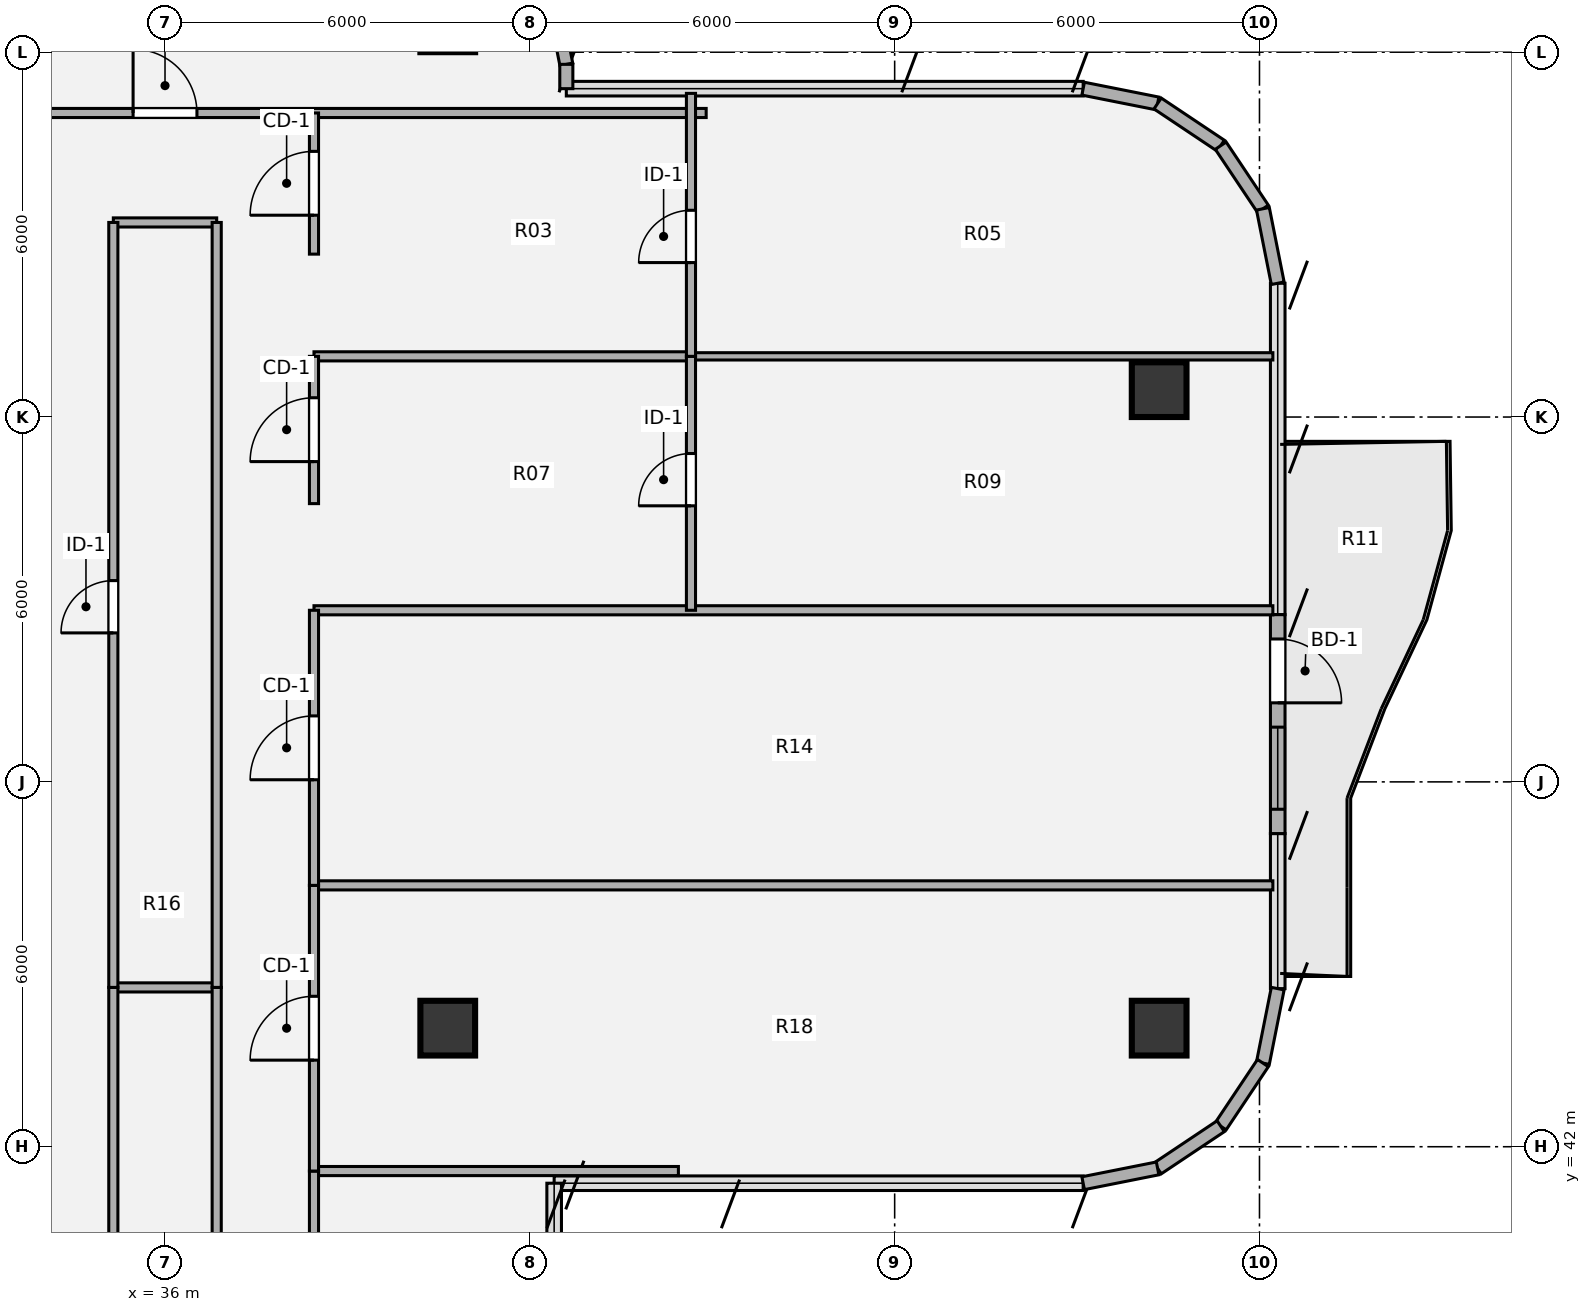
"""IFC4 building model, lengths in metres.
Left out: names, types, materials, properties, quantities, classifications, styles, units other than length and angle.
Written with IfcOpenShell. Run it as: python <this file> out.ifc"""

import sys

from ifc_helpers import new_model, si_unit, direction, frame, frame_2d, origin, origin_2d, place, context, subcontext, project, spatial, rectangle, hollow_circle, extrude, source, transform, mapped, element, fill, save


model = new_model("IFC4")
c1 = context("Model", 3, precision=1e-05, world=origin(), true_north=direction((0.0, 1.0)))
c2 = subcontext(c1, "Body", "Model", "MODEL_VIEW")
j1 = project(units=[si_unit("LENGTHUNIT", "METRE"), si_unit("PLANEANGLEUNIT", "RADIAN")], contexts=[c1])
p1 = place(None, origin())
s1 = spatial("IfcSite", under=j1, at=p1, CompositionType="ELEMENT")
p2 = place(p1, origin())
s2 = spatial("IfcBuilding", under=s1, at=p2, CompositionType="ELEMENT")
p3 = place(p2, frame((0.0, 0.0, 260.82)))
s3 = spatial("IfcBuildingStorey", under=s2, at=p3, CompositionType="ELEMENT", Elevation=260.82)
m1 = source(origin(), c2, "Body", "SweptSolid", [
    extrude(hollow_circle(Radius=0.45, WallThickness=0.032, at=origin_2d()), origin(), (0.0, 0.0, 1.0), 3.78),
])
for number, where, z_axis, x_axis in (
    (1, (52.35, 43.95, 0.0), (0.0, 0.0, 1.0), (1.0, 0.0, 0.0)),
    (2, (52.35, 54.45, 0.0), (0.0, 0.0, 1.0), (1.0, 0.0, 0.0)),
    (3, (40.65, 43.95, 0.0), (0.0, 0.0, 1.0), (1.0, 0.0, 0.0)),
):
    element("IfcColumn", number, at=place(p3, frame(where, z_axis=z_axis, x_axis=x_axis)), inside=s3, PredefinedType="COLUMN", context=c2, shape_type="MappedRepresentation", body=[
        mapped(m1, transform((0.0, 0.0, 0.0), x_axis=(1.0, 0.0, 0.0), y_axis=(0.0, 1.0, 0.0), z_axis=(0.0, 0.0, 1.0), scale=1.0)),
    ])
p4 = place(p3, frame((42.402, 60.795, 0.0), z_axis=(0.0, 0.0, 1.0), x_axis=(0.195190360752, -0.980765376158, 0.0)))
e4 = element("IfcWall", 4, at=p4, inside=s3, PredefinedType="SOLIDWALL", context=c2, shape_type="SweptSolid", body=[
    extrude(rectangle(XDim=1.014, YDim=0.215, at=frame_2d((0.507, 0.0))), origin(), (0.0, 0.0, 1.0), 3.53),
])
p5 = place(p3, frame((42.6, 59.8, 0.0), z_axis=(0.0, 0.0, 1.0), x_axis=(0.0, -1.0, 0.0)))
e5 = element("IfcWall", 5, at=p5, inside=s3, PredefinedType="SOLIDWALL", context=c2, shape_type="SweptSolid", body=[
    extrude(rectangle(XDim=0.4, YDim=0.215, at=frame_2d((0.2, 0.0))), origin(), (0.0, 0.0, 1.0), 3.53),
])
for number, where, z_axis, x_axis in (
    (6, (51.1, 59.4, 0.0), (0.0, 0.0, 1.0), (0.981, -0.195, 0.0)),
    (7, (52.325, 59.156, 0.0), (0.0, 0.0, 1.0), (0.831, -0.556, 0.0)),
    (8, (53.363, 58.463, 0.0), (0.0, 0.0, 1.0), (0.556, -0.831, 0.0)),
    (9, (54.056, 57.425, 0.0), (0.0, 0.0, 1.0), (0.195, -0.981, 0.0)),
):
    element("IfcWall", number, at=place(p3, frame(where, z_axis=z_axis, x_axis=x_axis)), inside=s3, PredefinedType="SOLIDWALL", context=c2, shape_type="SweptSolid", body=[
        extrude(rectangle(XDim=1.249, YDim=0.215, at=frame_2d((0.624, 0.0))), origin(), (0.0, 0.0, 1.0), 3.53),
    ])
p6 = place(p3, frame((54.3, 50.75, 0.0), z_axis=(0.0, 0.0, 1.0), x_axis=(0.0, -1.0, 0.0)))
e10 = element("IfcWall", 10, at=p6, inside=s3, PredefinedType="SOLIDWALL", context=c2, shape_type="SweptSolid", body=[
    extrude(rectangle(XDim=3.6, YDim=0.24, at=frame_2d((1.8, 0.0))), origin(), (0.0, 0.0, 1.0), 3.53),
])
p7 = place(p6, frame((0.4, 0.0, 0.0)))
e11 = element("IfcOpeningElement", 11, at=p7, cuts=e10, PredefinedType="OPENING", context=c2, shape_type="SweptSolid", body=[
    extrude(rectangle(XDim=1.05, YDim=2.15, at=origin_2d()), frame((0.525, 0.13, 1.075), z_axis=(0.0, -1.0, 0.0), x_axis=(1.0, 0.0, 0.0)), (0.0, 0.0, 1.0), 0.26),
])
p8 = place(p6, frame((1.85, 0.0, 0.85)))
e12 = element("IfcOpeningElement", 12, at=p8, cuts=e10, PredefinedType="OPENING", context=c2, shape_type="SweptSolid", body=[
    extrude(rectangle(XDim=1.35, YDim=1.35, at=origin_2d()), frame((0.675, 0.13, 0.675), z_axis=(0.0, -1.0, 0.0), x_axis=(1.0, 0.0, 0.0)), (0.0, 0.0, 1.0), 0.26),
])
for number, where, z_axis, x_axis in (
    (13, (54.3, 44.6, 0.0), (0.0, 0.0, 1.0), (-0.195, -0.981, 0.0)),
    (14, (54.056, 43.375, 0.0), (0.0, 0.0, 1.0), (-0.556, -0.831, 0.0)),
    (15, (53.363, 42.337, 0.0), (0.0, 0.0, 1.0), (-0.831, -0.556, 0.0)),
    (16, (52.325, 41.644, 0.0), (0.0, 0.0, 1.0), (-0.981, -0.195, 0.0)),
):
    element("IfcWall", number, at=place(p3, frame(where, z_axis=z_axis, x_axis=x_axis)), inside=s3, PredefinedType="SOLIDWALL", context=c2, shape_type="SweptSolid", body=[
        extrude(rectangle(XDim=1.249, YDim=0.215, at=frame_2d((0.624, 0.0))), origin(), (0.0, 0.0, 1.0), 3.53),
    ])
p9 = place(p3, frame((38.45, 41.6, 0.0), z_axis=(0.0, 0.0, 1.0), x_axis=(1.0, 0.0, 0.0)))
e17 = element("IfcWall", 17, at=p9, inside=s3, PredefinedType="PARTITIONING", context=c2, shape_type="SweptSolid", body=[
    extrude(rectangle(XDim=5.993, YDim=0.15, at=frame_2d((2.997, 0.0))), origin(), (0.0, 0.0, 1.0), 3.5),
])
p10 = place(p3, frame((35.15, 44.62, 0.0), z_axis=(0.0, 0.0, 1.0), x_axis=(1.0, 0.0, 0.0)))
e18 = element("IfcWall", 18, at=p10, inside=s3, PredefinedType="PARTITIONING", context=c2, shape_type="SweptSolid", body=[
    extrude(rectangle(XDim=1.7, YDim=0.15, at=frame_2d((0.85, 0.0))), origin(), (0.0, 0.0, 1.0), 3.259),
])
p11 = place(p3, frame((38.45, 46.298, 0.0), z_axis=(0.0, 0.0, 1.0), x_axis=(1.0, 0.0, 0.0)))
e19 = element("IfcWall", 19, at=p11, inside=s3, PredefinedType="PARTITIONING", context=c2, shape_type="SweptSolid", body=[
    extrude(rectangle(XDim=15.77, YDim=0.15, at=frame_2d((7.885, 0.0))), origin(), (0.0, 0.0, 1.0), 3.055),
])
p12 = place(p3, frame((38.45, 50.822, 0.0), z_axis=(0.0, 0.0, 1.0), x_axis=(1.0, 0.0, 0.0)))
e20 = element("IfcWall", 20, at=p12, inside=s3, PredefinedType="PARTITIONING", context=c2, shape_type="SweptSolid", body=[
    extrude(rectangle(XDim=15.77, YDim=0.15, at=frame_2d((7.885, 0.0))), origin(), (0.0, 0.0, 1.0), 2.982),
])
p13 = place(p3, frame((38.45, 54.998, 0.0), z_axis=(0.0, 0.0, 1.0), x_axis=(1.0, 0.0, 0.0)))
e21 = element("IfcWall", 21, at=p13, inside=s3, PredefinedType="PARTITIONING", context=c2, shape_type="SweptSolid", body=[
    extrude(rectangle(XDim=6.2, YDim=0.15, at=frame_2d((3.1, 0.0))), origin(), (0.0, 0.0, 1.0), 3.259),
])
p14 = place(p3, frame((44.65, 54.998, 0.0), z_axis=(0.0, 0.0, 1.0), x_axis=(1.0, 0.0, 0.0)))
e22 = element("IfcWall", 22, at=p14, inside=s3, PredefinedType="PARTITIONING", context=c2, shape_type="SweptSolid", body=[
    extrude(rectangle(XDim=9.57, YDim=0.12, at=frame_2d((4.785, 0.0))), origin(), (0.0, 0.0, 1.0), 3.5),
])
p15 = place(p3, frame((35.15, 57.2, 0.0), z_axis=(0.0, 0.0, 1.0), x_axis=(1.0, 0.0, 0.0)))
e23 = element("IfcWall", 23, at=p15, inside=s3, PredefinedType="PARTITIONING", context=c2, shape_type="SweptSolid", body=[
    extrude(rectangle(XDim=1.7, YDim=0.15, at=frame_2d((0.85, 0.0))), origin(), (0.0, 0.0, 1.0), 3.308),
])
p16 = place(p3, frame((27.1, 59.0, 0.0), z_axis=(0.0, 0.0, 1.0), x_axis=(1.0, 0.0, 0.0)))
e24 = element("IfcWall", 24, at=p16, inside=s3, PredefinedType="PARTITIONING", context=c2, shape_type="SweptSolid", body=[
    extrude(rectangle(XDim=17.8, YDim=0.15, at=frame_2d((8.9, 0.0))), origin(), (0.0, 0.0, 1.0), 3.308),
])
p17 = place(p16, frame((8.375, 0.0, 0.0)))
e25 = element("IfcOpeningElement", 25, at=p17, cuts=e24, PredefinedType="OPENING", context=c2, shape_type="SweptSolid", body=[
    extrude(rectangle(XDim=1.05, YDim=2.1, at=origin_2d()), frame((0.525, 0.085, 1.05), z_axis=(0.0, -1.0, 0.0), x_axis=(1.0, 0.0, 0.0)), (0.0, 0.0, 1.0), 0.17),
])
p18 = place(p3, frame((35.15, 25.2, 0.0), z_axis=(0.0, 0.0, 1.0), x_axis=(0.0, 1.0, 0.0)))
e26 = element("IfcWall", 26, at=p18, inside=s3, PredefinedType="PARTITIONING", context=c2, shape_type="SweptSolid", body=[
    extrude(rectangle(XDim=19.42, YDim=0.15, at=frame_2d((9.71, 0.0))), origin(), (0.0, 0.0, 1.0), 3.5),
])
p19 = place(p3, frame((35.15, 44.62, 0.0), z_axis=(0.0, 0.0, 1.0), x_axis=(0.0, 1.0, 0.0)))
e27 = element("IfcWall", 27, at=p19, inside=s3, PredefinedType="PARTITIONING", context=c2, shape_type="SweptSolid", body=[
    extrude(rectangle(XDim=12.58, YDim=0.15, at=frame_2d((6.29, 0.0))), origin(), (0.0, 0.0, 1.0), 3.5),
])
p20 = place(p19, frame((5.83, 0.0, 0.0)))
e28 = element("IfcOpeningElement", 28, at=p20, cuts=e27, PredefinedType="OPENING", context=c2, shape_type="SweptSolid", body=[
    extrude(rectangle(XDim=0.86, YDim=2.1, at=origin_2d()), frame((0.43, 0.085, 1.05), z_axis=(0.0, -1.0, 0.0), x_axis=(1.0, 0.0, 0.0)), (0.0, 0.0, 1.0), 0.17),
])
p21 = place(p3, frame((36.85, 25.2, 0.0), z_axis=(0.0, 0.0, 1.0), x_axis=(0.0, 1.0, 0.0)))
e29 = element("IfcWall", 29, at=p21, inside=s3, PredefinedType="PARTITIONING", context=c2, shape_type="SweptSolid", body=[
    extrude(rectangle(XDim=19.42, YDim=0.15, at=frame_2d((9.71, 0.0))), origin(), (0.0, 0.0, 1.0), 3.5),
])
p22 = place(p21, frame((9.185, 0.0, 0.0)))
e30 = element("IfcOpeningElement", 30, at=p22, cuts=e29, PredefinedType="OPENING", context=c2, shape_type="SweptSolid", body=[
    extrude(rectangle(XDim=1.05, YDim=2.1, at=origin_2d()), frame((0.525, 0.085, 1.05), z_axis=(0.0, -1.0, 0.0), x_axis=(1.0, 0.0, 0.0)), (0.0, 0.0, 1.0), 0.17),
])
p23 = place(p3, frame((36.85, 44.62, 0.0), z_axis=(0.0, 0.0, 1.0), x_axis=(0.0, 1.0, 0.0)))
e31 = element("IfcWall", 31, at=p23, inside=s3, PredefinedType="PARTITIONING", context=c2, shape_type="SweptSolid", body=[
    extrude(rectangle(XDim=12.58, YDim=0.15, at=frame_2d((6.29, 0.0))), origin(), (0.0, 0.0, 1.0), 3.5),
])
p24 = place(p3, frame((38.45, 22.4, 0.0), z_axis=(0.0, 0.0, 1.0), x_axis=(0.0, 1.0, 0.0)))
e32 = element("IfcWall", 32, at=p24, inside=s3, PredefinedType="PARTITIONING", context=c2, shape_type="SweptSolid", body=[
    extrude(rectangle(XDim=19.2, YDim=0.15, at=frame_2d((9.6, 0.0))), origin(), (0.0, 0.0, 1.0), 3.5),
])
p25 = place(p24, frame((8.975, 0.0, 0.0)))
e33 = element("IfcOpeningElement", 33, at=p25, cuts=e32, PredefinedType="OPENING", context=c2, shape_type="SweptSolid", body=[
    extrude(rectangle(XDim=1.05, YDim=2.1, at=origin_2d()), frame((0.525, 0.085, 1.05), z_axis=(0.0, -1.0, 0.0), x_axis=(1.0, 0.0, 0.0)), (0.0, 0.0, 1.0), 0.17),
])
p26 = place(p3, frame((38.45, 41.6, 0.0), z_axis=(0.0, 0.0, 1.0), x_axis=(0.0, 1.0, 0.0)))
e34 = element("IfcWall", 34, at=p26, inside=s3, PredefinedType="PARTITIONING", context=c2, shape_type="SweptSolid", body=[
    extrude(rectangle(XDim=4.698, YDim=0.15, at=frame_2d((2.349, 0.0))), origin(), (0.0, 0.0, 1.0), 3.5),
])
p27 = place(p26, frame((1.824, 0.0, 0.0)))
e35 = element("IfcOpeningElement", 35, at=p27, cuts=e34, PredefinedType="OPENING", context=c2, shape_type="SweptSolid", body=[
    extrude(rectangle(XDim=1.05, YDim=2.1, at=origin_2d()), frame((0.525, 0.085, 1.05), z_axis=(0.0, -1.0, 0.0), x_axis=(1.0, 0.0, 0.0)), (0.0, 0.0, 1.0), 0.17),
])
p28 = place(p3, frame((38.45, 46.298, 0.0), z_axis=(0.0, 0.0, 1.0), x_axis=(0.0, 1.0, 0.0)))
e36 = element("IfcWall", 36, at=p28, inside=s3, PredefinedType="PARTITIONING", context=c2, shape_type="SweptSolid", body=[
    extrude(rectangle(XDim=4.524, YDim=0.15, at=frame_2d((2.262, 0.0))), origin(), (0.0, 0.0, 1.0), 3.5),
])
p29 = place(p28, frame((1.737, 0.0, 0.0)))
e37 = element("IfcOpeningElement", 37, at=p29, cuts=e36, PredefinedType="OPENING", context=c2, shape_type="SweptSolid", body=[
    extrude(rectangle(XDim=1.05, YDim=2.1, at=origin_2d()), frame((0.525, 0.085, 1.05), z_axis=(0.0, -1.0, 0.0), x_axis=(1.0, 0.0, 0.0)), (0.0, 0.0, 1.0), 0.17),
])
p30 = place(p3, frame((38.45, 52.576, 0.0), z_axis=(0.0, 0.0, 1.0), x_axis=(0.0, 1.0, 0.0)))
e38 = element("IfcWall", 38, at=p30, inside=s3, PredefinedType="PARTITIONING", context=c2, shape_type="SweptSolid", body=[
    extrude(rectangle(XDim=2.422, YDim=0.15, at=frame_2d((1.211, 0.0))), origin(), (0.0, 0.0, 1.0), 3.5),
])
p31 = place(p30, frame((0.691, 0.0, 0.0)))
e39 = element("IfcOpeningElement", 39, at=p31, cuts=e38, PredefinedType="OPENING", context=c2, shape_type="SweptSolid", body=[
    extrude(rectangle(XDim=1.05, YDim=2.1, at=origin_2d()), frame((0.525, 0.085, 1.05), z_axis=(0.0, -1.0, 0.0), x_axis=(1.0, 0.0, 0.0)), (0.0, 0.0, 1.0), 0.17),
])
p32 = place(p3, frame((38.45, 56.679, 0.0), z_axis=(0.0, 0.0, 1.0), x_axis=(0.0, 1.0, 0.0)))
e40 = element("IfcWall", 40, at=p32, inside=s3, PredefinedType="PARTITIONING", context=c2, shape_type="SweptSolid", body=[
    extrude(rectangle(XDim=2.321, YDim=0.15, at=frame_2d((1.161, 0.0))), origin(), (0.0, 0.0, 1.0), 3.5),
])
p33 = place(p32, frame((0.64, 0.0, 0.0)))
e41 = element("IfcOpeningElement", 41, at=p33, cuts=e40, PredefinedType="OPENING", context=c2, shape_type="SweptSolid", body=[
    extrude(rectangle(XDim=1.05, YDim=2.1, at=origin_2d()), frame((0.525, 0.085, 1.05), z_axis=(0.0, -1.0, 0.0), x_axis=(1.0, 0.0, 0.0)), (0.0, 0.0, 1.0), 0.17),
])
p34 = place(p3, frame((44.65, 50.822, 0.0), z_axis=(0.0, 0.0, 1.0), x_axis=(0.0, 1.0, 0.0)))
e42 = element("IfcWall", 42, at=p34, inside=s3, PredefinedType="PARTITIONING", context=c2, shape_type="SweptSolid", body=[
    extrude(rectangle(XDim=4.176, YDim=0.15, at=frame_2d((2.088, 0.0))), origin(), (0.0, 0.0, 1.0), 3.5),
])
p35 = place(p34, frame((1.718, 0.0, 0.0)))
e43 = element("IfcOpeningElement", 43, at=p35, cuts=e42, PredefinedType="OPENING", context=c2, shape_type="SweptSolid", body=[
    extrude(rectangle(XDim=0.86, YDim=2.1, at=origin_2d()), frame((0.43, 0.085, 1.05), z_axis=(0.0, -1.0, 0.0), x_axis=(1.0, 0.0, 0.0)), (0.0, 0.0, 1.0), 0.17),
])
p36 = place(p3, frame((44.65, 54.998, 0.0), z_axis=(0.0, 0.0, 1.0), x_axis=(0.0, 1.0, 0.0)))
e44 = element("IfcWall", 44, at=p36, inside=s3, PredefinedType="PARTITIONING", context=c2, shape_type="SweptSolid", body=[
    extrude(rectangle(XDim=4.324, YDim=0.15, at=frame_2d((2.162, 0.0))), origin(), (0.0, 0.0, 1.0), 3.5),
])
p37 = place(p36, frame((1.542, 0.0, 0.0)))
e45 = element("IfcOpeningElement", 45, at=p37, cuts=e44, PredefinedType="OPENING", context=c2, shape_type="SweptSolid", body=[
    extrude(rectangle(XDim=0.86, YDim=2.1, at=origin_2d()), frame((0.43, 0.085, 1.05), z_axis=(0.0, -1.0, 0.0), x_axis=(1.0, 0.0, 0.0)), (0.0, 0.0, 1.0), 0.17),
])
m2 = source(origin(), c2, "Body", "SweptSolid", [
    extrude(rectangle(XDim=1.05, YDim=2.15, at=origin_2d()), frame((0.525, 0.025, 1.075), z_axis=(0.0, -1.0, 0.0), x_axis=(1.0, 0.0, 0.0)), (0.0, 0.0, 1.0), 0.05),
])
p38 = place(p7, origin())
e46 = element("IfcDoor", 46, at=p38, inside=s3, OperationType="SINGLE_SWING_RIGHT", PredefinedType="DOOR", context=c2, shape_type="MappedRepresentation", body=[
    mapped(m2, transform((0.0, 0.0, 0.0), x_axis=(1.0, 0.0, 0.0), y_axis=(0.0, 1.0, 0.0), z_axis=(0.0, 0.0, 1.0), scale=1.0)),
])
fill(e11, e46)
m3 = source(origin(), c2, "Body", "SweptSolid", [
    extrude(rectangle(XDim=1.35, YDim=1.35, at=origin_2d()), frame((0.675, 0.03, 0.675), z_axis=(0.0, -1.0, 0.0), x_axis=(1.0, 0.0, 0.0)), (0.0, 0.0, 1.0), 0.06),
])
p39 = place(p8, origin())
e47 = element("IfcWindow", 47, at=p39, inside=s3, PartitioningType="SINGLE_PANEL", PredefinedType="WINDOW", context=c2, shape_type="MappedRepresentation", body=[
    mapped(m3, transform((0.0, 0.0, 0.0), x_axis=(1.0, 0.0, 0.0), y_axis=(0.0, 1.0, 0.0), z_axis=(0.0, 0.0, 1.0), scale=1.0)),
])
fill(e12, e47)
m4 = source(origin(), c2, "Body", "SweptSolid", [
    extrude(rectangle(XDim=1.05, YDim=2.1, at=origin_2d()), frame((0.525, 0.025, 1.05), z_axis=(0.0, -1.0, 0.0), x_axis=(1.0, 0.0, 0.0)), (0.0, 0.0, 1.0), 0.05),
])
p40 = place(p17, origin())
e48 = element("IfcDoor", 48, at=p40, inside=s3, OperationType="SINGLE_SWING_LEFT", PredefinedType="DOOR", context=c2, shape_type="MappedRepresentation", body=[
    mapped(m4, transform((0.0, 0.0, 0.0), x_axis=(1.0, 0.0, 0.0), y_axis=(0.0, 1.0, 0.0), z_axis=(0.0, 0.0, 1.0), scale=1.0)),
])
fill(e25, e48)
m5 = source(origin(), c2, "Body", "SweptSolid", [
    extrude(rectangle(XDim=0.86, YDim=2.1, at=origin_2d()), frame((0.43, 0.025, 1.05), z_axis=(0.0, -1.0, 0.0), x_axis=(1.0, 0.0, 0.0)), (0.0, 0.0, 1.0), 0.05),
])
p41 = place(p20, origin())
e49 = element("IfcDoor", 49, at=p41, inside=s3, OperationType="SINGLE_SWING_LEFT", PredefinedType="DOOR", context=c2, shape_type="MappedRepresentation", body=[
    mapped(m5, transform((0.0, 0.0, 0.0), x_axis=(1.0, 0.0, 0.0), y_axis=(0.0, 1.0, 0.0), z_axis=(0.0, 0.0, 1.0), scale=1.0)),
])
fill(e28, e49)
m6 = source(origin(), c2, "Body", "SweptSolid", [
    extrude(rectangle(XDim=1.05, YDim=2.1, at=origin_2d()), frame((0.525, 0.025, 1.05), z_axis=(0.0, -1.0, 0.0), x_axis=(1.0, 0.0, 0.0)), (0.0, 0.0, 1.0), 0.05),
])
p42 = place(p27, origin())
e50 = element("IfcDoor", 50, at=p42, inside=s3, OperationType="SINGLE_SWING_LEFT", PredefinedType="DOOR", context=c2, shape_type="MappedRepresentation", body=[
    mapped(m6, transform((0.0, 0.0, 0.0), x_axis=(1.0, 0.0, 0.0), y_axis=(0.0, 1.0, 0.0), z_axis=(0.0, 0.0, 1.0), scale=1.0)),
])
fill(e35, e50)
p43 = place(p29, origin())
e51 = element("IfcDoor", 51, at=p43, inside=s3, OperationType="SINGLE_SWING_LEFT", PredefinedType="DOOR", context=c2, shape_type="MappedRepresentation", body=[
    mapped(m6, transform((0.0, 0.0, 0.0), x_axis=(1.0, 0.0, 0.0), y_axis=(0.0, 1.0, 0.0), z_axis=(0.0, 0.0, 1.0), scale=1.0)),
])
fill(e37, e51)
p44 = place(p31, origin())
e52 = element("IfcDoor", 52, at=p44, inside=s3, OperationType="SINGLE_SWING_LEFT", PredefinedType="DOOR", context=c2, shape_type="MappedRepresentation", body=[
    mapped(m6, transform((0.0, 0.0, 0.0), x_axis=(1.0, 0.0, 0.0), y_axis=(0.0, 1.0, 0.0), z_axis=(0.0, 0.0, 1.0), scale=1.0)),
])
fill(e39, e52)
p45 = place(p33, origin())
e53 = element("IfcDoor", 53, at=p45, inside=s3, OperationType="SINGLE_SWING_LEFT", PredefinedType="DOOR", context=c2, shape_type="MappedRepresentation", body=[
    mapped(m6, transform((0.0, 0.0, 0.0), x_axis=(1.0, 0.0, 0.0), y_axis=(0.0, 1.0, 0.0), z_axis=(0.0, 0.0, 1.0), scale=1.0)),
])
fill(e41, e53)
p46 = place(p35, origin())
e54 = element("IfcDoor", 54, at=p46, inside=s3, OperationType="SINGLE_SWING_LEFT", PredefinedType="DOOR", context=c2, shape_type="MappedRepresentation", body=[
    mapped(m5, transform((0.0, 0.0, 0.0), x_axis=(1.0, 0.0, 0.0), y_axis=(0.0, 1.0, 0.0), z_axis=(0.0, 0.0, 1.0), scale=1.0)),
])
fill(e43, e54)
p47 = place(p37, origin())
e55 = element("IfcDoor", 55, at=p47, inside=s3, OperationType="SINGLE_SWING_LEFT", PredefinedType="DOOR", context=c2, shape_type="MappedRepresentation", body=[
    mapped(m5, transform((0.0, 0.0, 0.0), x_axis=(1.0, 0.0, 0.0), y_axis=(0.0, 1.0, 0.0), z_axis=(0.0, 0.0, 1.0), scale=1.0)),
])
fill(e45, e55)
save(model, sys.argv[1])
